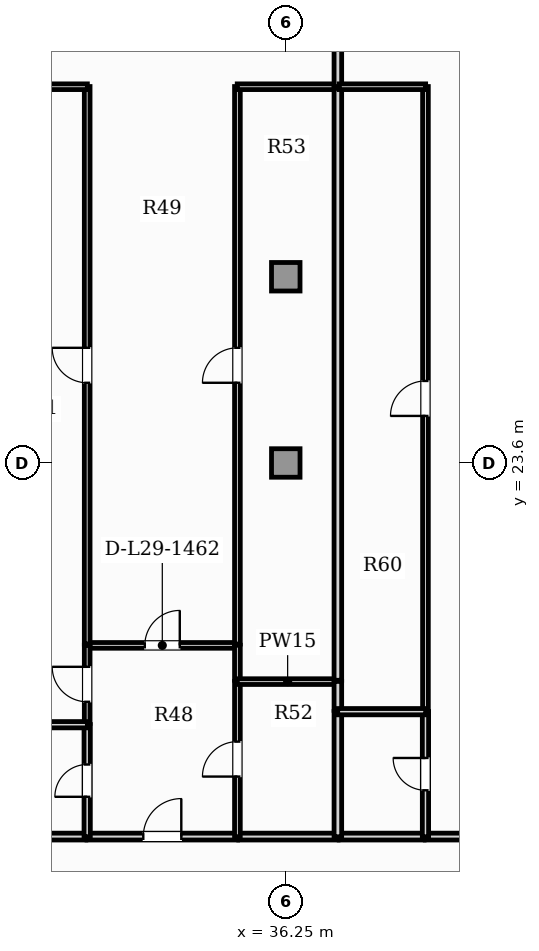
"""IFC4 building model, lengths in metres.
Left out: names, types, materials, properties, quantities, classifications, styles, units other than length and angle.
Written with IfcOpenShell. Run it as: python <this file> out.ifc"""

import sys

from ifc_helpers import new_model, si_unit, direction, frame, frame_2d, origin, origin_2d, place, context, subcontext, project, spatial, rectangle, extrude, element, fill, save


model = new_model("IFC4")
c1 = context("Model", 3, precision=1e-05, world=origin(), true_north=direction((0.0, 1.0)))
c2 = subcontext(c1, "Body", "Model", "MODEL_VIEW")
j1 = project(units=[si_unit("LENGTHUNIT", "METRE"), si_unit("PLANEANGLEUNIT", "RADIAN")], contexts=[c1])
p1 = place(None, origin())
s1 = spatial("IfcSite", under=j1, at=p1, CompositionType="ELEMENT")
p2 = place(p1, origin())
s2 = spatial("IfcBuilding", under=s1, at=p2, CompositionType="ELEMENT")
p3 = place(p2, frame((0.0, 0.0, 119.55)))
s3 = spatial("IfcBuildingStorey", under=s2, at=p3, CompositionType="ELEMENT", Elevation=119.55)
for number, where, z_axis, x_axis in (
    (1, (36.25, 23.6, 0.0), (0.0, 0.0, 1.0), (1.0, 0.0, 0.0)),
    (2, (36.25, 28.5, 0.0), (0.0, 0.0, 1.0), (1.0, 0.0, 0.0)),
):
    element("IfcColumn", number, at=place(p3, frame(where, z_axis=z_axis, x_axis=x_axis)), inside=s3, PredefinedType="COLUMN", context=c2, shape_type="SweptSolid", body=[
        extrude(rectangle(XDim=0.75, YDim=0.75, at=origin_2d()), origin(), (0.0, 0.0, 1.0), 3.85),
    ])
p4 = place(p3, frame((31.02, 13.77, 0.0), z_axis=(0.0, 0.0, 1.0), x_axis=(1.0, 0.0, 0.0)))
e3 = element("IfcWall", 3, at=p4, inside=s3, PredefinedType="PARTITIONING", context=c2, shape_type="SweptSolid", body=[
    extrude(rectangle(XDim=3.963, YDim=0.18, at=frame_2d((1.981, 0.0))), origin(), (0.0, 0.0, 1.0), 3.6),
])
p5 = place(p4, frame((1.481, 0.0, 0.0)))
e4 = element("IfcOpeningElement", 4, at=p5, cuts=e3, PredefinedType="OPENING", context=c2, shape_type="SweptSolid", body=[
    extrude(rectangle(XDim=1.0, YDim=2.15, at=frame_2d((0.5, 1.075))), frame((0.0, 0.1, 0.0), z_axis=(0.0, -1.0, 0.0), x_axis=(1.0, 0.0, 0.0)), (0.0, 0.0, 1.0), 0.2),
])
p6 = place(p3, frame((28.491, 13.77, 0.0), z_axis=(0.0, 0.0, 1.0), x_axis=(1.0, 0.0, 0.0)))
e5 = element("IfcWall", 5, at=p6, inside=s3, PredefinedType="PARTITIONING", context=c2, shape_type="SweptSolid", body=[
    extrude(rectangle(XDim=2.498, YDim=0.18, at=frame_2d((1.249, 0.0))), origin(), (0.0, 0.0, 1.0), 3.6),
])
p7 = place(p3, frame((35.013, 13.77, 0.0), z_axis=(0.0, 0.0, 1.0), x_axis=(1.0, 0.0, 0.0)))
e6 = element("IfcWall", 6, at=p7, inside=s3, PredefinedType="PARTITIONING", context=c2, shape_type="SweptSolid", body=[
    extrude(rectangle(XDim=2.613, YDim=0.18, at=frame_2d((1.307, 0.0))), origin(), (0.0, 0.0, 1.0), 3.6),
])
p8 = place(p3, frame((39.92, 13.77, 0.0), z_axis=(0.0, 0.0, 1.0), x_axis=(1.0, 0.0, 0.0)))
e7 = element("IfcWall", 7, at=p8, inside=s3, PredefinedType="PARTITIONING", context=c2, shape_type="SweptSolid", body=[
    extrude(rectangle(XDim=3.422, YDim=0.18, at=frame_2d((1.711, 0.0))), origin(), (0.0, 0.0, 1.0), 3.6),
])
p9 = place(p8, frame((1.211, 0.0, 0.0)))
e8 = element("IfcOpeningElement", 8, at=p9, cuts=e7, PredefinedType="OPENING", context=c2, shape_type="SweptSolid", body=[
    extrude(rectangle(XDim=1.0, YDim=2.15, at=frame_2d((0.5, 1.075))), frame((0.0, 0.1, 0.0), z_axis=(0.0, -1.0, 0.0), x_axis=(1.0, 0.0, 0.0)), (0.0, 0.0, 1.0), 0.2),
])
p10 = place(p3, frame((37.656, 13.77, 0.0), z_axis=(0.0, 0.0, 1.0), x_axis=(1.0, 0.0, 0.0)))
e9 = element("IfcWall", 9, at=p10, inside=s3, PredefinedType="PARTITIONING", context=c2, shape_type="SweptSolid", body=[
    extrude(rectangle(XDim=2.235, YDim=0.18, at=frame_2d((1.117, 0.0))), origin(), (0.0, 0.0, 1.0), 3.6),
])
p11 = place(p3, frame((31.02, 18.801, 0.0), z_axis=(0.0, 0.0, 1.0), x_axis=(1.0, 0.0, 0.0)))
e10 = element("IfcWall", 10, at=p11, inside=s3, PredefinedType="PARTITIONING", context=c2, shape_type="SweptSolid", body=[
    extrude(rectangle(XDim=3.963, YDim=0.15, at=frame_2d((1.981, 0.0))), origin(), (0.0, 0.0, 1.0), 3.6),
])
p12 = place(p11, frame((1.521, 0.0, 0.0)))
e11 = element("IfcOpeningElement", 11, at=p12, cuts=e10, PredefinedType="OPENING", context=c2, shape_type="SweptSolid", body=[
    extrude(rectangle(XDim=0.92, YDim=2.1, at=frame_2d((0.46, 1.05))), frame((0.0, 0.085, 0.0), z_axis=(0.0, -1.0, 0.0), x_axis=(1.0, 0.0, 0.0)), (0.0, 0.0, 1.0), 0.17),
])
p13 = place(p3, frame((31.025, 13.765, 0.0), z_axis=(0.0, 0.0, 1.0), x_axis=(0.0, 1.0, 0.0)))
e12 = element("IfcWall", 12, at=p13, inside=s3, PredefinedType="PLUMBINGWALL", context=c2, shape_type="SweptSolid", body=[
    extrude(rectangle(XDim=2.953, YDim=0.165, at=frame_2d((1.477, 0.0))), origin(), (0.0, 0.0, 1.0), 3.6),
])
p14 = place(p13, frame((1.052, 0.0, 0.0)))
e13 = element("IfcOpeningElement", 13, at=p14, cuts=e12, PredefinedType="OPENING", context=c2, shape_type="SweptSolid", body=[
    extrude(rectangle(XDim=0.85, YDim=2.1, at=frame_2d((0.425, 1.05))), frame((0.0, 0.093, 0.0), z_axis=(0.0, -1.0, 0.0), x_axis=(1.0, 0.0, 0.0)), (0.0, 0.0, 1.0), 0.185),
])
p15 = place(p3, frame((31.025, 16.748, 0.0), z_axis=(0.0, 0.0, 1.0), x_axis=(0.0, 1.0, 0.0)))
e14 = element("IfcWall", 14, at=p15, inside=s3, PredefinedType="PARTITIONING", context=c2, shape_type="SweptSolid", body=[
    extrude(rectangle(XDim=2.057, YDim=0.15, at=frame_2d((1.029, 0.0))), origin(), (0.0, 0.0, 1.0), 3.6),
])
p16 = place(p15, frame((0.569, 0.0, 0.0)))
e15 = element("IfcOpeningElement", 15, at=p16, cuts=e14, PredefinedType="OPENING", context=c2, shape_type="SweptSolid", body=[
    extrude(rectangle(XDim=0.92, YDim=2.1, at=frame_2d((0.46, 1.05))), frame((0.0, 0.085, 0.0), z_axis=(0.0, -1.0, 0.0), x_axis=(1.0, 0.0, 0.0)), (0.0, 0.0, 1.0), 0.17),
])
p17 = place(p3, frame((34.978, 13.765, 0.0), z_axis=(0.0, 0.0, 1.0), x_axis=(0.0, 1.0, 0.0)))
e16 = element("IfcWall", 16, at=p17, inside=s3, PredefinedType="PARTITIONING", context=c2, shape_type="SweptSolid", body=[
    extrude(rectangle(XDim=4.087, YDim=0.15, at=frame_2d((2.044, 0.0))), origin(), (0.0, 0.0, 1.0), 3.6),
])
p18 = place(p17, frame((1.584, 0.0, 0.0)))
e17 = element("IfcOpeningElement", 17, at=p18, cuts=e16, PredefinedType="OPENING", context=c2, shape_type="SweptSolid", body=[
    extrude(rectangle(XDim=0.92, YDim=2.1, at=frame_2d((0.46, 1.05))), frame((0.0, 0.085, 0.0), z_axis=(0.0, -1.0, 0.0), x_axis=(1.0, 0.0, 0.0)), (0.0, 0.0, 1.0), 0.17),
])
p19 = place(p3, frame((34.978, 17.882, 0.0), z_axis=(0.0, 0.0, 1.0), x_axis=(0.0, 1.0, 0.0)))
e18 = element("IfcWall", 18, at=p19, inside=s3, PredefinedType="PARTITIONING", context=c2, shape_type="SweptSolid", body=[
    extrude(rectangle(XDim=0.923, YDim=0.15, at=frame_2d((0.461, 0.0))), origin(), (0.0, 0.0, 1.0), 3.6),
])
p20 = place(p3, frame((31.025, 18.835, 0.0), z_axis=(0.0, 0.0, 1.0), x_axis=(0.0, 1.0, 0.0)))
e19 = element("IfcWall", 19, at=p20, inside=s3, PredefinedType="PARTITIONING", context=c2, shape_type="SweptSolid", body=[
    extrude(rectangle(XDim=14.669, YDim=0.15, at=frame_2d((7.335, 0.0))), origin(), (0.0, 0.0, 1.0), 3.6),
])
p21 = place(p20, frame((6.875, 0.0, 0.0)))
e20 = element("IfcOpeningElement", 20, at=p21, cuts=e19, PredefinedType="OPENING", context=c2, shape_type="SweptSolid", body=[
    extrude(rectangle(XDim=0.92, YDim=2.1, at=frame_2d((0.46, 1.05))), frame((0.0, 0.085, 0.0), z_axis=(0.0, -1.0, 0.0), x_axis=(1.0, 0.0, 0.0)), (0.0, 0.0, 1.0), 0.17),
])
p22 = place(p3, frame((28.491, 33.5, 0.0), z_axis=(0.0, 0.0, 1.0), x_axis=(1.0, 0.0, 0.0)))
e21 = element("IfcWall", 21, at=p22, inside=s3, PredefinedType="PARTITIONING", context=c2, shape_type="SweptSolid", body=[
    extrude(rectangle(XDim=2.538, YDim=0.15, at=frame_2d((1.269, 0.0))), origin(), (0.0, 0.0, 1.0), 3.6),
])
p23 = place(p3, frame((34.978, 18.835, 0.0), z_axis=(0.0, 0.0, 1.0), x_axis=(0.0, 1.0, 0.0)))
e22 = element("IfcWall", 22, at=p23, inside=s3, PredefinedType="PARTITIONING", context=c2, shape_type="SweptSolid", body=[
    extrude(rectangle(XDim=14.669, YDim=0.15, at=frame_2d((7.335, 0.0))), origin(), (0.0, 0.0, 1.0), 3.6),
])
p24 = place(p23, frame((6.875, 0.0, 0.0)))
e23 = element("IfcOpeningElement", 23, at=p24, cuts=e22, PredefinedType="OPENING", context=c2, shape_type="SweptSolid", body=[
    extrude(rectangle(XDim=0.92, YDim=2.1, at=frame_2d((0.46, 1.05))), frame((0.0, 0.085, 0.0), z_axis=(0.0, -1.0, 0.0), x_axis=(1.0, 0.0, 0.0)), (0.0, 0.0, 1.0), 0.17),
])
p25 = place(p3, frame((34.973, 33.5, 0.0), z_axis=(0.0, 0.0, 1.0), x_axis=(1.0, 0.0, 0.0)))
e24 = element("IfcWall", 24, at=p25, inside=s3, PredefinedType="PARTITIONING", context=c2, shape_type="SweptSolid", body=[
    extrude(rectangle(XDim=2.653, YDim=0.15, at=frame_2d((1.327, 0.0))), origin(), (0.0, 0.0, 1.0), 3.6),
])
p26 = place(p3, frame((37.621, 33.495, 0.0), z_axis=(0.0, 0.0, 1.0), x_axis=(0.0, 1.0, 0.0)))
e25 = element("IfcWall", 25, at=p26, inside=s3, PredefinedType="PARTITIONING", context=c2, shape_type="SweptSolid", body=[
    extrude(rectangle(XDim=1.51, YDim=0.2, at=frame_2d((0.755, 0.0))), origin(), (0.0, 0.0, 1.0), 3.6),
])
p27 = place(p3, frame((28.451, 16.713, 0.0), z_axis=(0.0, 0.0, 1.0), x_axis=(1.0, 0.0, 0.0)))
e26 = element("IfcWall", 26, at=p27, inside=s3, PredefinedType="PLUMBINGWALL", context=c2, shape_type="SweptSolid", body=[
    extrude(rectangle(XDim=2.578, YDim=0.165, at=frame_2d((1.289, 0.0))), origin(), (0.0, 0.0, 1.0), 3.6),
])
p28 = place(p3, frame((34.973, 17.847, 0.0), z_axis=(0.0, 0.0, 1.0), x_axis=(1.0, 0.0, 0.0)))
e27 = element("IfcWall", 27, at=p28, inside=s3, PredefinedType="PARTITIONING", context=c2, shape_type="SweptSolid", body=[
    extrude(rectangle(XDim=2.653, YDim=0.15, at=frame_2d((1.327, 0.0))), origin(), (0.0, 0.0, 1.0), 3.6),
])
p29 = place(p3, frame((37.621, 13.765, 0.0), z_axis=(0.0, 0.0, 1.0), x_axis=(0.0, 1.0, 0.0)))
e28 = element("IfcWall", 28, at=p29, inside=s3, PredefinedType="PARTITIONING", context=c2, shape_type="SweptSolid", body=[
    extrude(rectangle(XDim=3.296, YDim=0.2, at=frame_2d((1.648, 0.0))), origin(), (0.0, 0.0, 1.0), 3.6),
])
p30 = place(p3, frame((37.621, 17.091, 0.0), z_axis=(0.0, 0.0, 1.0), x_axis=(0.0, 1.0, 0.0)))
e29 = element("IfcWall", 29, at=p30, inside=s3, PredefinedType="PARTITIONING", context=c2, shape_type="SweptSolid", body=[
    extrude(rectangle(XDim=0.761, YDim=0.2, at=frame_2d((0.38, 0.0))), origin(), (0.0, 0.0, 1.0), 3.6),
])
p31 = place(p3, frame((37.621, 17.882, 0.0), z_axis=(0.0, 0.0, 1.0), x_axis=(0.0, 1.0, 0.0)))
e30 = element("IfcWall", 30, at=p31, inside=s3, PredefinedType="PARTITIONING", context=c2, shape_type="SweptSolid", body=[
    extrude(rectangle(XDim=15.583, YDim=0.2, at=frame_2d((7.792, 0.0))), origin(), (0.0, 0.0, 1.0), 3.6),
])
p32 = place(p3, frame((39.926, 13.765, 0.0), z_axis=(0.0, 0.0, 1.0), x_axis=(0.0, 1.0, 0.0)))
e31 = element("IfcWall", 31, at=p32, inside=s3, PredefinedType="PLUMBINGWALL", context=c2, shape_type="SweptSolid", body=[
    extrude(rectangle(XDim=3.296, YDim=0.165, at=frame_2d((1.648, 0.0))), origin(), (0.0, 0.0, 1.0), 3.6),
])
p33 = place(p32, frame((1.223, 0.0, 0.0)))
e32 = element("IfcOpeningElement", 32, at=p33, cuts=e31, PredefinedType="OPENING", context=c2, shape_type="SweptSolid", body=[
    extrude(rectangle(XDim=0.85, YDim=2.1, at=frame_2d((0.425, 1.05))), frame((0.0, 0.093, 0.0), z_axis=(0.0, -1.0, 0.0), x_axis=(1.0, 0.0, 0.0)), (0.0, 0.0, 1.0), 0.185),
])
p34 = place(p3, frame((39.926, 17.091, 0.0), z_axis=(0.0, 0.0, 1.0), x_axis=(0.0, 1.0, 0.0)))
e33 = element("IfcWall", 33, at=p34, inside=s3, PredefinedType="PARTITIONING", context=c2, shape_type="SweptSolid", body=[
    extrude(rectangle(XDim=16.414, YDim=0.15, at=frame_2d((8.207, 0.0))), origin(), (0.0, 0.0, 1.0), 3.6),
])
p35 = place(p34, frame((7.747, 0.0, 0.0)))
e34 = element("IfcOpeningElement", 34, at=p35, cuts=e33, PredefinedType="OPENING", context=c2, shape_type="SweptSolid", body=[
    extrude(rectangle(XDim=0.92, YDim=2.1, at=frame_2d((0.46, 1.05))), frame((0.0, 0.085, 0.0), z_axis=(0.0, -1.0, 0.0), x_axis=(1.0, 0.0, 0.0)), (0.0, 0.0, 1.0), 0.17),
])
p36 = place(p3, frame((37.656, 33.5, 0.0), z_axis=(0.0, 0.0, 1.0), x_axis=(1.0, 0.0, 0.0)))
e35 = element("IfcWall", 35, at=p36, inside=s3, PredefinedType="PARTITIONING", context=c2, shape_type="SweptSolid", body=[
    extrude(rectangle(XDim=2.275, YDim=0.15, at=frame_2d((1.137, 0.0))), origin(), (0.0, 0.0, 1.0), 3.6),
])
p37 = place(p3, frame((37.616, 17.056, 0.0), z_axis=(0.0, 0.0, 1.0), x_axis=(1.0, 0.0, 0.0)))
e36 = element("IfcWall", 36, at=p37, inside=s3, PredefinedType="PLUMBINGWALL", context=c2, shape_type="SweptSolid", body=[
    extrude(rectangle(XDim=2.315, YDim=0.165, at=frame_2d((1.157, 0.0))), origin(), (0.0, 0.0, 1.0), 3.6),
])
p38 = place(p5, origin())
e37 = element("IfcDoor", 37, at=p38, inside=s3, OperationType="SINGLE_SWING_RIGHT", PredefinedType="DOOR", context=c2, shape_type="SweptSolid", body=[
    extrude(rectangle(XDim=1.0, YDim=2.15, at=frame_2d((0.5, 1.075))), frame((0.0, 0.025, 0.0), z_axis=(0.0, -1.0, 0.0), x_axis=(1.0, 0.0, 0.0)), (0.0, 0.0, 1.0), 0.05),
])
fill(e4, e37)
p39 = place(p12, origin())
e38 = element("IfcDoor", 38, at=p39, inside=s3, OperationType="SINGLE_SWING_RIGHT", PredefinedType="DOOR", context=c2, shape_type="SweptSolid", body=[
    extrude(rectangle(XDim=0.92, YDim=2.1, at=frame_2d((0.46, 1.05))), frame((0.0, 0.025, 0.0), z_axis=(0.0, -1.0, 0.0), x_axis=(1.0, 0.0, 0.0)), (0.0, 0.0, 1.0), 0.05),
])
fill(e11, e38)
p40 = place(p14, origin())
e39 = element("IfcDoor", 39, at=p40, inside=s3, OperationType="SINGLE_SWING_LEFT", PredefinedType="DOOR", context=c2, shape_type="SweptSolid", body=[
    extrude(rectangle(XDim=0.85, YDim=2.1, at=frame_2d((0.425, 1.05))), frame((0.0, 0.025, 0.0), z_axis=(0.0, -1.0, 0.0), x_axis=(1.0, 0.0, 0.0)), (0.0, 0.0, 1.0), 0.05),
])
fill(e13, e39)
p41 = place(p16, origin())
e40 = element("IfcDoor", 40, at=p41, inside=s3, OperationType="SINGLE_SWING_RIGHT", PredefinedType="DOOR", context=c2, shape_type="SweptSolid", body=[
    extrude(rectangle(XDim=0.92, YDim=2.1, at=frame_2d((0.46, 1.05))), frame((0.0, 0.025, 0.0), z_axis=(0.0, -1.0, 0.0), x_axis=(1.0, 0.0, 0.0)), (0.0, 0.0, 1.0), 0.05),
])
fill(e15, e40)
p42 = place(p18, origin())
e41 = element("IfcDoor", 41, at=p42, inside=s3, OperationType="SINGLE_SWING_LEFT", PredefinedType="DOOR", context=c2, shape_type="SweptSolid", body=[
    extrude(rectangle(XDim=0.92, YDim=2.1, at=frame_2d((0.46, 1.05))), frame((0.0, 0.025, 0.0), z_axis=(0.0, -1.0, 0.0), x_axis=(1.0, 0.0, 0.0)), (0.0, 0.0, 1.0), 0.05),
])
fill(e17, e41)
p43 = place(p21, origin())
e42 = element("IfcDoor", 42, at=p43, inside=s3, OperationType="SINGLE_SWING_RIGHT", PredefinedType="DOOR", context=c2, shape_type="SweptSolid", body=[
    extrude(rectangle(XDim=0.92, YDim=2.1, at=frame_2d((0.46, 1.05))), frame((0.0, 0.025, 0.0), z_axis=(0.0, -1.0, 0.0), x_axis=(1.0, 0.0, 0.0)), (0.0, 0.0, 1.0), 0.05),
])
fill(e20, e42)
p44 = place(p24, origin())
e43 = element("IfcDoor", 43, at=p44, inside=s3, OperationType="SINGLE_SWING_LEFT", PredefinedType="DOOR", context=c2, shape_type="SweptSolid", body=[
    extrude(rectangle(XDim=0.92, YDim=2.1, at=frame_2d((0.46, 1.05))), frame((0.0, 0.025, 0.0), z_axis=(0.0, -1.0, 0.0), x_axis=(1.0, 0.0, 0.0)), (0.0, 0.0, 1.0), 0.05),
])
fill(e23, e43)
p45 = place(p33, origin())
e44 = element("IfcDoor", 44, at=p45, inside=s3, OperationType="SINGLE_SWING_RIGHT", PredefinedType="DOOR", context=c2, shape_type="SweptSolid", body=[
    extrude(rectangle(XDim=0.85, YDim=2.1, at=frame_2d((0.425, 1.05))), frame((0.0, 0.025, 0.0), z_axis=(0.0, -1.0, 0.0), x_axis=(1.0, 0.0, 0.0)), (0.0, 0.0, 1.0), 0.05),
])
fill(e32, e44)
p46 = place(p35, origin())
e45 = element("IfcDoor", 45, at=p46, inside=s3, OperationType="SINGLE_SWING_LEFT", PredefinedType="DOOR", context=c2, shape_type="SweptSolid", body=[
    extrude(rectangle(XDim=0.92, YDim=2.1, at=frame_2d((0.46, 1.05))), frame((0.0, 0.025, 0.0), z_axis=(0.0, -1.0, 0.0), x_axis=(1.0, 0.0, 0.0)), (0.0, 0.0, 1.0), 0.05),
])
fill(e34, e45)
save(model, sys.argv[1])
